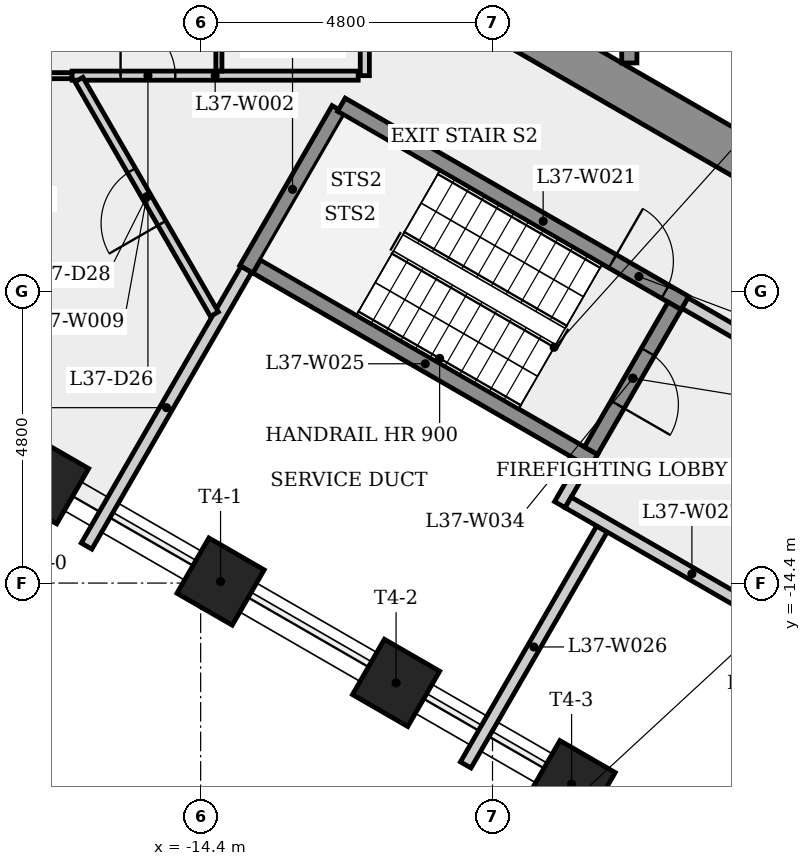
"""IFC4 building model, lengths in metres.
Left out: names, types, materials, properties, quantities, classifications, styles, units other than length and angle.
Written with IfcOpenShell. Run it as: python <this file> out.ifc"""

import sys

from ifc_helpers import new_model, si_unit, direction, frame, frame_2d, origin, origin_2d, place, context, subcontext, project, spatial, rectangle, extrude, element, fill, save


model = new_model("IFC4")
c1 = context("Model", 3, precision=1e-05, world=origin(), true_north=direction((0.0, 1.0)))
c2 = subcontext(c1, "Body", "Model", "MODEL_VIEW")
j1 = project(units=[si_unit("LENGTHUNIT", "METRE"), si_unit("PLANEANGLEUNIT", "RADIAN")], contexts=[c1])
p1 = place(None, origin())
s1 = spatial("IfcSite", under=j1, at=p1, CompositionType="ELEMENT")
p2 = place(p1, origin())
s2 = spatial("IfcBuilding", under=s1, at=p2, CompositionType="ELEMENT")
p3 = place(p2, frame((0.0, 0.0, 139.9)))
s3 = spatial("IfcBuildingStorey", under=s2, at=p3, CompositionType="ELEMENT", Elevation=139.9)
p4 = place(p3, frame((-9.325, -5.182, 0.0), z_axis=(0.0, 0.0, 1.0), x_axis=(0.866023993627, -0.500002442456, 0.0)))
e1 = element("IfcWall", 1, at=p4, inside=s3, PredefinedType="SHEAR", context=c2, shape_type="SweptSolid", body=[
    extrude(rectangle(XDim=10.97, YDim=0.7, at=frame_2d((5.485, 0.0))), origin(), (0.0, 0.0, 1.0), 4.0),
])
p5 = place(p4, frame((5.682, 0.0, 0.0)))
e2 = element("IfcOpeningElement", 2, at=p5, cuts=e1, PredefinedType="OPENING", context=c2, shape_type="SweptSolid", body=[
    extrude(rectangle(XDim=0.9, YDim=2.1, at=frame_2d((0.45, 1.05))), frame((0.0, 0.36, 0.0), z_axis=(0.0, -1.0, 0.0), x_axis=(1.0, 0.0, 0.0)), (0.0, 0.0, 1.0), 0.72),
])
for number, where, z_axis, x_axis in (
    (3, (-16.959, -12.708, 0.0), (0.0, 0.0, 1.0), (-0.5, -0.866, 0.0)),
    (4, (-14.073, -14.375, 0.0), (0.0, 0.0, 1.0), (-0.5, -0.866, 0.0)),
    (5, (-11.186, -16.042, 0.0), (0.0, 0.0, 1.0), (-0.5, -0.866, 0.0)),
    (6, (-8.3, -17.708, 0.0), (0.0, 0.0, 1.0), (-0.5, -0.866, 0.0)),
):
    element("IfcColumn", number, at=place(p3, frame(where, z_axis=z_axis, x_axis=x_axis)), inside=s3, PredefinedType="COLUMN", context=c2, shape_type="SweptSolid", body=[
        extrude(rectangle(XDim=1.05, YDim=1.05, at=origin_2d()), origin(), (0.0, 0.0, 1.0), 4.0),
    ])
p6 = place(p3, frame((-16.514, -6.054, 0.0), z_axis=(0.0, 0.0, 1.0), x_axis=(-1.0, 0.0, 0.0)))
e7 = element("IfcWall", 7, at=p6, inside=s3, PredefinedType="PARTITIONING", context=c2, shape_type="SweptSolid", body=[
    extrude(rectangle(XDim=1.98, YDim=0.1, at=frame_2d((0.99, 0.0))), origin(), (0.0, 0.0, 1.0), 3.6),
])
p7 = place(p3, frame((-16.514, -6.054, 0.0), z_axis=(0.0, 0.0, 1.0), x_axis=(1.0, 0.0, 0.0)))
e8 = element("IfcWall", 8, at=p7, inside=s3, PredefinedType="PARTITIONING", context=c2, shape_type="SweptSolid", body=[
    extrude(rectangle(XDim=4.705, YDim=0.15, at=frame_2d((2.353, 0.0))), origin(), (0.0, 0.0, 1.0), 3.6),
])
p8 = place(p7, frame((0.797, 0.0, 0.0)))
e9 = element("IfcOpeningElement", 9, at=p8, cuts=e8, PredefinedType="OPENING", context=c2, shape_type="SweptSolid", body=[
    extrude(rectangle(XDim=0.9, YDim=2.1, at=frame_2d((0.45, 1.05))), frame((0.0, 0.085, 0.0), z_axis=(0.0, -1.0, 0.0), x_axis=(1.0, 0.0, 0.0)), (0.0, 0.0, 1.0), 0.17),
])
p9 = place(p3, frame((-16.276, -13.791, 0.0), z_axis=(0.0, 0.0, 1.0), x_axis=(0.499970375258, 0.866042506961, 0.0)))
e10 = element("IfcWall", 10, at=p9, inside=s3, PredefinedType="PLUMBINGWALL", context=c2, shape_type="SweptSolid", body=[
    extrude(rectangle(XDim=5.257, YDim=0.2, at=frame_2d((2.628, 0.0))), origin(), (0.0, 0.0, 1.0), 3.6),
])
p10 = place(p3, frame((-14.174, -9.977, 0.0), z_axis=(0.0, 0.0, 1.0), x_axis=(-0.500011854745, 0.866018559336, 0.0)))
e11 = element("IfcWall", 11, at=p10, inside=s3, PredefinedType="PARTITIONING", context=c2, shape_type="SweptSolid", body=[
    extrude(rectangle(XDim=4.455, YDim=0.15, at=frame_2d((2.227, 0.0))), origin(), (0.0, 0.0, 1.0), 3.6),
])
p11 = place(p10, frame((1.727, 0.0, 0.0)))
e12 = element("IfcOpeningElement", 12, at=p11, cuts=e11, PredefinedType="OPENING", context=c2, shape_type="SweptSolid", body=[
    extrude(rectangle(XDim=1.0, YDim=2.1, at=frame_2d((0.5, 1.05))), frame((0.0, 0.085, 0.0), z_axis=(0.0, -1.0, 0.0), x_axis=(1.0, 0.0, 0.0)), (0.0, 0.0, 1.0), 0.17),
])
p12 = place(p3, frame((-14.1, -3.704, 0.0), z_axis=(0.0, 0.0, 1.0), x_axis=(0.0, -1.0, 0.0)))
e13 = element("IfcWall", 13, at=p12, inside=s3, PredefinedType="PARTITIONING", context=c2, shape_type="SweptSolid", body=[
    extrude(rectangle(XDim=2.275, YDim=0.1, at=frame_2d((1.138, 0.0))), origin(), (0.0, 0.0, 1.0), 3.6),
])
p13 = place(p3, frame((-13.648, -9.239, 0.0), z_axis=(0.0, 0.0, 1.0), x_axis=(0.50000556753, 0.866022189346, 0.0)))
e14 = element("IfcWall", 14, at=p13, inside=s3, PredefinedType="SHEAR", context=c2, shape_type="SweptSolid", body=[
    extrude(rectangle(XDim=3.036, YDim=0.25, at=frame_2d((1.518, 0.0))), origin(), (0.0, 0.0, 1.0), 3.6),
])
p14 = place(p3, frame((-12.085, -6.532, 0.0), z_axis=(0.0, 0.0, 1.0), x_axis=(0.86604373436, -0.499968249168, 0.0)))
e15 = element("IfcWall", 15, at=p14, inside=s3, PredefinedType="SHEAR", context=c2, shape_type="SweptSolid", body=[
    extrude(rectangle(XDim=1.118, YDim=0.25, at=frame_2d((0.559, 0.0))), origin(), (0.0, 0.0, 1.0), 3.6),
])
p15 = place(p3, frame((-11.7, 6.129, 0.0), z_axis=(0.0, 0.0, 1.0), x_axis=(0.0, -1.0, 0.0)))
e16 = element("IfcWall", 16, at=p15, inside=s3, PredefinedType="PARTITIONING", context=c2, shape_type="SweptSolid", body=[
    extrude(rectangle(XDim=12.183, YDim=0.15, at=frame_2d((6.092, 0.0))), origin(), (0.0, 0.0, 1.0), 3.6),
])
p16 = place(p15, frame((6.847, 0.0, 0.0)))
e17 = element("IfcOpeningElement", 17, at=p16, cuts=e16, PredefinedType="OPENING", context=c2, shape_type="SweptSolid", body=[
    extrude(rectangle(XDim=0.9, YDim=2.1, at=frame_2d((0.45, 1.05))), frame((0.0, 0.085, 0.0), z_axis=(0.0, -1.0, 0.0), x_axis=(1.0, 0.0, 0.0)), (0.0, 0.0, 1.0), 0.17),
])
p17 = place(p3, frame((-11.1, -7.101, 0.0), z_axis=(0.0, 0.0, 1.0), x_axis=(0.866028615007, -0.499994437958, 0.0)))
e18 = element("IfcWall", 18, at=p17, inside=s3, PredefinedType="SHEAR", context=c2, shape_type="SweptSolid", body=[
    extrude(rectangle(XDim=5.387, YDim=0.25, at=frame_2d((2.694, 0.0))), origin(), (0.0, 0.0, 1.0), 3.6),
])
p18 = place(p17, frame((4.012, 0.0, 0.0)))
e19 = element("IfcOpeningElement", 19, at=p18, cuts=e18, PredefinedType="OPENING", context=c2, shape_type="SweptSolid", body=[
    extrude(rectangle(XDim=1.0, YDim=2.1, at=frame_2d((0.5, 1.05))), frame((0.0, 0.135, 0.0), z_axis=(0.0, -1.0, 0.0), x_axis=(1.0, 0.0, 0.0)), (0.0, 0.0, 1.0), 0.27),
])
p19 = place(p3, frame((-8.493, -13.11, 0.0), z_axis=(0.0, 0.0, 1.0), x_axis=(0.500067724834, 0.865986299303, 0.0)))
e20 = element("IfcWall", 20, at=p19, inside=s3, PredefinedType="PLUMBINGWALL", context=c2, shape_type="SweptSolid", body=[
    extrude(rectangle(XDim=0.775, YDim=0.2, at=frame_2d((0.388, 0.0))), origin(), (0.0, 0.0, 1.0), 3.6),
])
p20 = place(p3, frame((-7.935, -12.393, 0.0), z_axis=(0.0, 0.0, 1.0), x_axis=(-0.866025499775, 0.499999833739, 0.0)))
e21 = element("IfcWall", 21, at=p20, inside=s3, PredefinedType="SHEAR", context=c2, shape_type="SweptSolid", body=[
    extrude(rectangle(XDim=6.4, YDim=0.25, at=frame_2d((3.2, 0.0))), origin(), (0.0, 0.0, 1.0), 3.6),
])
p21 = place(p3, frame((-7.8, -13.51, 0.0), z_axis=(0.0, 0.0, 1.0), x_axis=(-0.499994393058, -0.866028640929, 0.0)))
e22 = element("IfcWall", 22, at=p21, inside=s3, PredefinedType="PLUMBINGWALL", context=c2, shape_type="SweptSolid", body=[
    extrude(rectangle(XDim=4.481, YDim=0.2, at=frame_2d((2.241, 0.0))), origin(), (0.0, 0.0, 1.0), 3.6),
])
p22 = place(p3, frame((-8.356, -13.073, 0.0), z_axis=(0.0, 0.0, 1.0), x_axis=(0.866038532462, -0.499977259774, 0.0)))
e23 = element("IfcWall", 23, at=p22, inside=s3, PredefinedType="PLUMBINGWALL", context=c2, shape_type="SweptSolid", body=[
    extrude(rectangle(XDim=4.7, YDim=0.2, at=frame_2d((2.35, 0.0))), origin(), (0.0, 0.0, 1.0), 3.6),
])
p23 = place(p3, frame((-7.35, -5.846, 0.0), z_axis=(0.0, 0.0, 1.0), x_axis=(0.0, 1.0, 0.0)))
e24 = element("IfcWall", 24, at=p23, inside=s3, PredefinedType="SHEAR", context=c2, shape_type="SweptSolid", body=[
    extrude(rectangle(XDim=4.171, YDim=0.25, at=frame_2d((2.085, 0.0))), origin(), (0.0, 0.0, 1.0), 3.6),
])
p24 = place(p3, frame((-6.605, -9.841, 0.0), z_axis=(0.0, 0.0, 1.0), x_axis=(-0.499996545922, -0.866027397988, 0.0)))
e25 = element("IfcWall", 25, at=p24, inside=s3, PredefinedType="SHEAR", context=c2, shape_type="SweptSolid", body=[
    extrude(rectangle(XDim=2.75, YDim=0.25, at=frame_2d((1.375, 0.0))), origin(), (0.0, 0.0, 1.0), 3.6),
])
p25 = place(p24, frame((0.875, 0.0, 0.0)))
e26 = element("IfcOpeningElement", 26, at=p25, cuts=e25, PredefinedType="OPENING", context=c2, shape_type="SweptSolid", body=[
    extrude(rectangle(XDim=1.0, YDim=2.1, at=frame_2d((0.5, 1.05))), frame((0.0, 0.135, 0.0), z_axis=(0.0, -1.0, 0.0), x_axis=(1.0, 0.0, 0.0)), (0.0, 0.0, 1.0), 0.27),
])
p26 = place(p3, frame((-6.435, -9.795, 0.0), z_axis=(0.0, 0.0, 1.0), x_axis=(0.866012907634, -0.500021643343, 0.0)))
e27 = element("IfcWall", 27, at=p26, inside=s3, PredefinedType="PARTITIONING", context=c2, shape_type="SweptSolid", body=[
    extrude(rectangle(XDim=4.45, YDim=0.2, at=frame_2d((2.225, 0.0))), origin(), (0.0, 0.0, 1.0), 3.6),
])
p27 = place(p26, frame((1.675, 0.0, 0.0)))
e28 = element("IfcOpeningElement", 28, at=p27, cuts=e27, PredefinedType="OPENING", context=c2, shape_type="SweptSolid", body=[
    extrude(rectangle(XDim=1.1, YDim=2.1, at=frame_2d((0.55, 1.05))), frame((0.0, 0.11, 0.0), z_axis=(0.0, -1.0, 0.0), x_axis=(1.0, 0.0, 0.0)), (0.0, 0.0, 1.0), 0.22),
])
p28 = place(p18, origin())
e29 = element("IfcDoor", 29, at=p28, inside=s3, OperationType="SINGLE_SWING_LEFT", PredefinedType="DOOR", context=c2, shape_type="SweptSolid", body=[
    extrude(rectangle(XDim=1.0, YDim=2.1, at=frame_2d((0.5, 1.05))), frame((0.0, 0.025, 0.0), z_axis=(0.0, -1.0, 0.0), x_axis=(1.0, 0.0, 0.0)), (0.0, 0.0, 1.0), 0.05),
])
fill(e19, e29)
p29 = place(p25, origin())
e30 = element("IfcDoor", 30, at=p29, inside=s3, OperationType="SINGLE_SWING_RIGHT", PredefinedType="DOOR", context=c2, shape_type="SweptSolid", body=[
    extrude(rectangle(XDim=1.0, YDim=2.1, at=frame_2d((0.5, 1.05))), frame((0.0, 0.025, 0.0), z_axis=(0.0, -1.0, 0.0), x_axis=(1.0, 0.0, 0.0)), (0.0, 0.0, 1.0), 0.05),
])
fill(e26, e30)
p30 = place(p8, origin())
e31 = element("IfcDoor", 31, at=p30, inside=s3, OperationType="SINGLE_SWING_LEFT", PredefinedType="DOOR", context=c2, shape_type="SweptSolid", body=[
    extrude(rectangle(XDim=0.9, YDim=2.1, at=frame_2d((0.45, 1.05))), frame((0.0, 0.025, 0.0), z_axis=(0.0, -1.0, 0.0), x_axis=(1.0, 0.0, 0.0)), (0.0, 0.0, 1.0), 0.05),
])
fill(e9, e31)
p31 = place(p11, origin())
e32 = element("IfcDoor", 32, at=p31, inside=s3, OperationType="SINGLE_SWING_LEFT", PredefinedType="DOOR", context=c2, shape_type="SweptSolid", body=[
    extrude(rectangle(XDim=1.0, YDim=2.1, at=frame_2d((0.5, 1.05))), frame((0.0, 0.025, 0.0), z_axis=(0.0, -1.0, 0.0), x_axis=(1.0, 0.0, 0.0)), (0.0, 0.0, 1.0), 0.05),
])
fill(e12, e32)
save(model, sys.argv[1])
